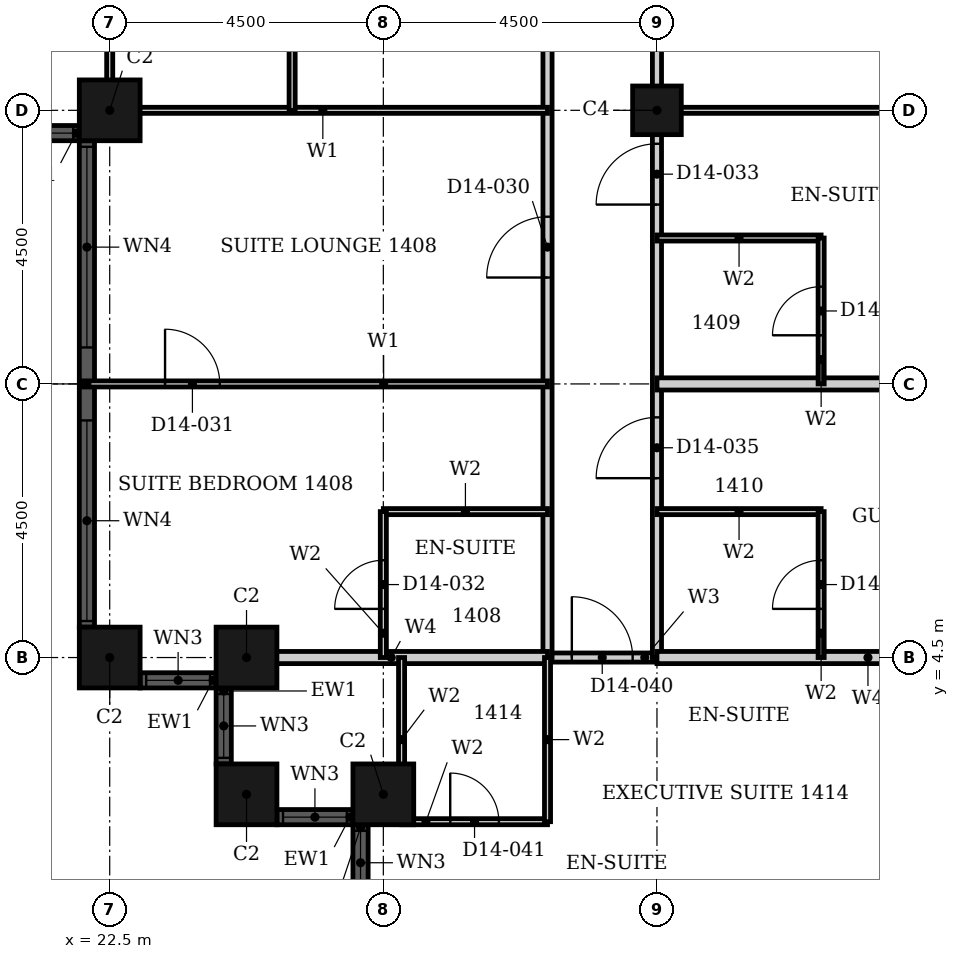
"""IFC4 building model, lengths in metres.
Left out: names, types, materials, properties, quantities, classifications, styles, units other than length and angle.
Written with IfcOpenShell. Run it as: python <this file> out.ifc"""

import sys

from ifc_helpers import new_model, si_unit, direction, frame, frame_2d, origin, origin_2d, place, context, subcontext, project, spatial, rectangle, hollow_rectangle, extrude, element, fill, save


model = new_model("IFC4")
c1 = context("Model", 3, precision=1e-05, world=origin(), true_north=direction((0.0, 1.0)))
c2 = subcontext(c1, "Body", "Model", "MODEL_VIEW")
j1 = project(units=[si_unit("LENGTHUNIT", "METRE"), si_unit("PLANEANGLEUNIT", "RADIAN")], contexts=[c1])
p1 = place(None, origin())
s1 = spatial("IfcSite", under=j1, at=p1, CompositionType="ELEMENT")
p2 = place(p1, origin())
s2 = spatial("IfcBuilding", under=s1, at=p2, CompositionType="ELEMENT")
p3 = place(p2, frame((0.0, 0.0, 63.6)))
s3 = spatial("IfcBuildingStorey", under=s2, at=p3, CompositionType="ELEMENT", Elevation=63.6)
for number, where, z_axis, x_axis in (
    (1, (22.5, 4.5, 0.0), (0.0, 0.0, 1.0), (1.0, 0.0, 0.0)),
    (2, (24.75, 4.5, 0.0), (0.0, 0.0, 1.0), (1.0, 0.0, 0.0)),
    (3, (24.75, 2.25, 0.0), (0.0, 0.0, 1.0), (1.0, 0.0, 0.0)),
    (4, (27.0, 2.25, 0.0), (0.0, 0.0, 1.0), (1.0, 0.0, 0.0)),
    (5, (22.5, 13.5, 0.0), (0.0, 0.0, 1.0), (1.0, 0.0, 0.0)),
):
    element("IfcColumn", number, at=place(p3, frame(where, z_axis=z_axis, x_axis=x_axis)), inside=s3, PredefinedType="COLUMN", context=c2, shape_type="SweptSolid", body=[
        extrude(hollow_rectangle(XDim=1.0, YDim=1.0, WallThickness=0.032, at=origin_2d()), origin(), (0.0, 0.0, 1.0), 3.6),
    ])
p4 = place(p3, frame((31.5, 13.5, 0.0), z_axis=(0.0, 0.0, 1.0), x_axis=(1.0, 0.0, 0.0)))
e6 = element("IfcColumn", 6, at=p4, inside=s3, PredefinedType="COLUMN", context=c2, shape_type="SweptSolid", body=[
    extrude(hollow_rectangle(XDim=0.8, YDim=0.8, WallThickness=0.025, at=origin_2d()), origin(), (0.0, 0.0, 1.0), 3.6),
])
p5 = place(p3, frame((23.0, 4.125, 0.0), z_axis=(0.0, 0.0, 1.0), x_axis=(1.0, 0.0, 0.0)))
e7 = element("IfcWall", 7, at=p5, inside=s3, PredefinedType="SOLIDWALL", context=c2, shape_type="SweptSolid", body=[
    extrude(rectangle(XDim=1.25, YDim=0.25, at=frame_2d((0.625, 0.0))), origin(), (0.0, 0.0, 1.0), 3.6),
])
p6 = place(p5, frame((0.1, 0.0, 0.9)))
e8 = element("IfcOpeningElement", 8, at=p6, cuts=e7, PredefinedType="OPENING", context=c2, shape_type="SweptSolid", body=[
    extrude(rectangle(XDim=1.05, YDim=2.08, at=frame_2d((0.525, 1.04))), frame((0.0, 0.135, 0.0), z_axis=(0.0, -1.0, 0.0), x_axis=(1.0, 0.0, 0.0)), (0.0, 0.0, 1.0), 0.27),
])
p7 = place(p3, frame((24.375, 4.0, 0.0), z_axis=(0.0, 0.0, 1.0), x_axis=(0.0, -1.0, 0.0)))
e9 = element("IfcWall", 9, at=p7, inside=s3, PredefinedType="SOLIDWALL", context=c2, shape_type="SweptSolid", body=[
    extrude(rectangle(XDim=1.25, YDim=0.25, at=frame_2d((0.625, 0.0))), origin(), (0.0, 0.0, 1.0), 3.6),
])
p8 = place(p7, frame((0.1, 0.0, 0.9)))
e10 = element("IfcOpeningElement", 10, at=p8, cuts=e9, PredefinedType="OPENING", context=c2, shape_type="SweptSolid", body=[
    extrude(rectangle(XDim=1.05, YDim=2.08, at=frame_2d((0.525, 1.04))), frame((0.0, 0.135, 0.0), z_axis=(0.0, -1.0, 0.0), x_axis=(1.0, 0.0, 0.0)), (0.0, 0.0, 1.0), 0.27),
])
p9 = place(p3, frame((25.25, 1.875, 0.0), z_axis=(0.0, 0.0, 1.0), x_axis=(1.0, 0.0, 0.0)))
e11 = element("IfcWall", 11, at=p9, inside=s3, PredefinedType="SOLIDWALL", context=c2, shape_type="SweptSolid", body=[
    extrude(rectangle(XDim=1.25, YDim=0.25, at=frame_2d((0.625, 0.0))), origin(), (0.0, 0.0, 1.0), 3.6),
])
p10 = place(p9, frame((0.1, 0.0, 0.9)))
e12 = element("IfcOpeningElement", 12, at=p10, cuts=e11, PredefinedType="OPENING", context=c2, shape_type="SweptSolid", body=[
    extrude(rectangle(XDim=1.05, YDim=2.08, at=frame_2d((0.525, 1.04))), frame((0.0, 0.135, 0.0), z_axis=(0.0, -1.0, 0.0), x_axis=(1.0, 0.0, 0.0)), (0.0, 0.0, 1.0), 0.27),
])
p11 = place(p3, frame((26.625, 1.75, 0.0), z_axis=(0.0, 0.0, 1.0), x_axis=(0.0, -1.0, 0.0)))
e13 = element("IfcWall", 13, at=p11, inside=s3, PredefinedType="SOLIDWALL", context=c2, shape_type="SweptSolid", body=[
    extrude(rectangle(XDim=1.25, YDim=0.25, at=frame_2d((0.625, 0.0))), origin(), (0.0, 0.0, 1.0), 3.6),
])
p12 = place(p11, frame((0.1, 0.0, 0.9)))
e14 = element("IfcOpeningElement", 14, at=p12, cuts=e13, PredefinedType="OPENING", context=c2, shape_type="SweptSolid", body=[
    extrude(rectangle(XDim=1.05, YDim=2.08, at=frame_2d((0.525, 1.04))), frame((0.0, 0.135, 0.0), z_axis=(0.0, -1.0, 0.0), x_axis=(1.0, 0.0, 0.0)), (0.0, 0.0, 1.0), 0.27),
])
p13 = place(p3, frame((18.5, 13.125, 0.0), z_axis=(0.0, 0.0, 1.0), x_axis=(1.0, 0.0, 0.0)))
e15 = element("IfcWall", 15, at=p13, inside=s3, PredefinedType="SOLIDWALL", context=c2, shape_type="SweptSolid", body=[
    extrude(rectangle(XDim=3.5, YDim=0.25, at=frame_2d((1.75, 0.0))), origin(), (0.0, 0.0, 1.0), 3.6),
])
p14 = place(p13, frame((0.1, 0.0, 0.9)))
e16 = element("IfcOpeningElement", 16, at=p14, cuts=e15, PredefinedType="OPENING", context=c2, shape_type="SweptSolid", body=[
    extrude(rectangle(XDim=3.3, YDim=2.08, at=frame_2d((1.65, 1.04))), frame((0.0, 0.135, 0.0), z_axis=(0.0, -1.0, 0.0), x_axis=(1.0, 0.0, 0.0)), (0.0, 0.0, 1.0), 0.27),
])
p15 = place(p3, frame((22.125, 13.0, 0.0), z_axis=(0.0, 0.0, 1.0), x_axis=(0.0, -1.0, 0.0)))
e17 = element("IfcWall", 17, at=p15, inside=s3, PredefinedType="SOLIDWALL", context=c2, shape_type="SweptSolid", body=[
    extrude(rectangle(XDim=8.0, YDim=0.25, at=frame_2d((4.0, 0.0))), origin(), (0.0, 0.0, 1.0), 3.6),
])
p16 = place(p15, frame((0.1, 0.0, 0.9)))
e18 = element("IfcOpeningElement", 18, at=p16, cuts=e17, PredefinedType="OPENING", context=c2, shape_type="SweptSolid", body=[
    extrude(rectangle(XDim=3.3, YDim=2.08, at=frame_2d((1.65, 1.04))), frame((0.0, 0.135, 0.0), z_axis=(0.0, -1.0, 0.0), x_axis=(1.0, 0.0, 0.0)), (0.0, 0.0, 1.0), 0.27),
])
p17 = place(p15, frame((4.6, 0.0, 0.9)))
e19 = element("IfcOpeningElement", 19, at=p17, cuts=e17, PredefinedType="OPENING", context=c2, shape_type="SweptSolid", body=[
    extrude(rectangle(XDim=3.3, YDim=2.08, at=frame_2d((1.65, 1.04))), frame((0.0, 0.135, 0.0), z_axis=(0.0, -1.0, 0.0), x_axis=(1.0, 0.0, 0.0)), (0.0, 0.0, 1.0), 0.27),
])
p18 = place(p3, frame((29.7, 4.5, 0.0), z_axis=(0.0, 0.0, 1.0), x_axis=(1.0, 0.0, 0.0)))
e20 = element("IfcWall", 20, at=p18, inside=s3, PredefinedType="PARTITIONING", context=c2, shape_type="SweptSolid", body=[
    extrude(rectangle(XDim=1.8, YDim=0.15, at=frame_2d((0.9, 0.0))), origin(), (0.0, 0.0, 1.0), 3.3),
])
p19 = place(p18, frame((0.4, 0.0, 0.0)))
e21 = element("IfcOpeningElement", 21, at=p19, cuts=e20, PredefinedType="OPENING", context=c2, shape_type="SweptSolid", body=[
    extrude(rectangle(XDim=1.0, YDim=2.1, at=frame_2d((0.5, 1.05))), frame((0.0, 0.085, 0.0), z_axis=(0.0, -1.0, 0.0), x_axis=(1.0, 0.0, 0.0)), (0.0, 0.0, 1.0), 0.17),
])
p20 = place(p3, frame((29.7, 4.5, 0.0), z_axis=(0.0, 0.0, 1.0), x_axis=(0.0, 1.0, 0.0)))
e22 = element("IfcWall", 22, at=p20, inside=s3, PredefinedType="PARTITIONING", context=c2, shape_type="SweptSolid", body=[
    extrude(rectangle(XDim=16.2, YDim=0.15, at=frame_2d((8.1, 0.0))), origin(), (0.0, 0.0, 1.0), 3.3),
])
p21 = place(p20, frame((6.25, 0.0, 0.0)))
e23 = element("IfcOpeningElement", 23, at=p21, cuts=e22, PredefinedType="OPENING", context=c2, shape_type="SweptSolid", body=[
    extrude(rectangle(XDim=1.0, YDim=2.1, at=frame_2d((0.5, 1.05))), frame((0.0, 0.085, 0.0), z_axis=(0.0, -1.0, 0.0), x_axis=(1.0, 0.0, 0.0)), (0.0, 0.0, 1.0), 0.17),
])
p22 = place(p3, frame((31.5, 4.5, 0.0), z_axis=(0.0, 0.0, 1.0), x_axis=(0.0, 1.0, 0.0)))
e24 = element("IfcWall", 24, at=p22, inside=s3, PredefinedType="PARTITIONING", context=c2, shape_type="SweptSolid", body=[
    extrude(rectangle(XDim=16.2, YDim=0.15, at=frame_2d((8.1, 0.0))), origin(), (0.0, 0.0, 1.0), 2.58),
])
p23 = place(p22, frame((7.45, 0.0, 0.0)))
e25 = element("IfcOpeningElement", 25, at=p23, cuts=e24, PredefinedType="OPENING", context=c2, shape_type="SweptSolid", body=[
    extrude(rectangle(XDim=1.0, YDim=2.1, at=frame_2d((0.5, 1.05))), frame((0.0, 0.085, 0.0), z_axis=(0.0, -1.0, 0.0), x_axis=(1.0, 0.0, 0.0)), (0.0, 0.0, 1.0), 0.17),
])
p24 = place(p22, frame((2.95, 0.0, 0.0)))
e26 = element("IfcOpeningElement", 26, at=p24, cuts=e24, PredefinedType="OPENING", context=c2, shape_type="SweptSolid", body=[
    extrude(rectangle(XDim=1.0, YDim=2.1, at=frame_2d((0.5, 1.05))), frame((0.0, 0.085, 0.0), z_axis=(0.0, -1.0, 0.0), x_axis=(1.0, 0.0, 0.0)), (0.0, 0.0, 1.0), 0.17),
])
p25 = place(p3, frame((31.5, 13.5, 0.0), z_axis=(0.0, 0.0, 1.0), x_axis=(1.0, 0.0, 0.0)))
e27 = element("IfcWall", 27, at=p25, inside=s3, PredefinedType="PARTITIONING", context=c2, shape_type="SweptSolid", body=[
    extrude(rectangle(XDim=9.19, YDim=0.1, at=frame_2d((4.595, 0.0))), origin(), (0.0, 0.0, 1.0), 2.38),
])
p26 = place(p3, frame((22.31, 13.5, 0.0), z_axis=(0.0, 0.0, 1.0), x_axis=(1.0, 0.0, 0.0)))
e28 = element("IfcWall", 28, at=p26, inside=s3, PredefinedType="PARTITIONING", context=c2, shape_type="SweptSolid", body=[
    extrude(rectangle(XDim=7.39, YDim=0.1, at=frame_2d((3.695, 0.0))), origin(), (0.0, 0.0, 1.0), 2.38),
])
p27 = place(p3, frame((22.06, 9.0, 0.0), z_axis=(0.0, 0.0, 1.0), x_axis=(1.0, 0.0, 0.0)))
e29 = element("IfcWall", 29, at=p27, inside=s3, PredefinedType="PARTITIONING", context=c2, shape_type="SweptSolid", body=[
    extrude(rectangle(XDim=7.64, YDim=0.1, at=frame_2d((3.82, 0.0))), origin(), (0.0, 0.0, 1.0), 3.3),
])
p28 = place(p27, frame((1.35, 0.0, 0.0)))
e30 = element("IfcOpeningElement", 30, at=p28, cuts=e29, PredefinedType="OPENING", context=c2, shape_type="SweptSolid", body=[
    extrude(rectangle(XDim=0.9, YDim=2.1, at=frame_2d((0.45, 1.05))), frame((0.0, 0.06, 0.0), z_axis=(0.0, -1.0, 0.0), x_axis=(1.0, 0.0, 0.0)), (0.0, 0.0, 1.0), 0.12),
])
p29 = place(p3, frame((22.5, 13.31, 0.0), z_axis=(0.0, 0.0, 1.0), x_axis=(0.0, 1.0, 0.0)))
e31 = element("IfcWall", 31, at=p29, inside=s3, PredefinedType="PARTITIONING", context=c2, shape_type="SweptSolid", body=[
    extrude(rectangle(XDim=7.39, YDim=0.1, at=frame_2d((3.695, 0.0))), origin(), (0.0, 0.0, 1.0), 3.3),
])
p30 = place(p3, frame((25.5, 13.5, 0.0), z_axis=(0.0, 0.0, 1.0), x_axis=(0.0, 1.0, 0.0)))
e32 = element("IfcWall", 32, at=p30, inside=s3, PredefinedType="PARTITIONING", context=c2, shape_type="SweptSolid", body=[
    extrude(rectangle(XDim=7.2, YDim=0.1, at=frame_2d((3.6, 0.0))), origin(), (0.0, 0.0, 1.0), 3.3),
])
p31 = place(p3, frame((31.5, 4.5, 0.0), z_axis=(0.0, 0.0, 1.0), x_axis=(1.0, 0.0, 0.0)))
e33 = element("IfcWall", 33, at=p31, inside=s3, PredefinedType="PARTITIONING", context=c2, shape_type="SweptSolid", body=[
    extrude(rectangle(XDim=6.94, YDim=0.2, at=frame_2d((3.47, 0.0))), origin(), (0.0, 0.0, 1.0), 3.3),
])
p32 = place(p3, frame((24.56, 4.5, 0.0), z_axis=(0.0, 0.0, 1.0), x_axis=(1.0, 0.0, 0.0)))
e34 = element("IfcWall", 34, at=p32, inside=s3, PredefinedType="PARTITIONING", context=c2, shape_type="SweptSolid", body=[
    extrude(rectangle(XDim=5.14, YDim=0.2, at=frame_2d((2.57, 0.0))), origin(), (0.0, 0.0, 1.0), 3.3),
])
p33 = place(p3, frame((31.5, 9.0, 0.0), z_axis=(0.0, 0.0, 1.0), x_axis=(1.0, 0.0, 0.0)))
e35 = element("IfcWall", 35, at=p33, inside=s3, PredefinedType="PARTITIONING", context=c2, shape_type="SweptSolid", body=[
    extrude(rectangle(XDim=9.44, YDim=0.2, at=frame_2d((4.72, 0.0))), origin(), (0.0, 0.0, 1.0), 3.3),
])
p34 = place(p3, frame((27.3, 1.8, 0.0), z_axis=(0.0, 0.0, 1.0), x_axis=(1.0, 0.0, 0.0)))
e36 = element("IfcWall", 36, at=p34, inside=s3, PredefinedType="PARTITIONING", context=c2, shape_type="SweptSolid", body=[
    extrude(rectangle(XDim=2.4, YDim=0.1, at=frame_2d((1.2, 0.0))), origin(), (0.0, 0.0, 1.0), 3.3),
])
p35 = place(p34, frame((0.8, 0.0, 0.0)))
e37 = element("IfcOpeningElement", 37, at=p35, cuts=e36, PredefinedType="OPENING", context=c2, shape_type="SweptSolid", body=[
    extrude(rectangle(XDim=0.8, YDim=2.1, at=frame_2d((0.4, 1.05))), frame((0.0, 0.06, 0.0), z_axis=(0.0, -1.0, 0.0), x_axis=(1.0, 0.0, 0.0)), (0.0, 0.0, 1.0), 0.12),
])
for number, where, z_axis, x_axis in (
    (38, (31.5, 11.4, 0.0), (0.0, 0.0, 1.0), (1.0, 0.0, 0.0)),
    (39, (31.5, 6.9, 0.0), (0.0, 0.0, 1.0), (1.0, 0.0, 0.0)),
    (40, (27.0, 6.9, 0.0), (0.0, 0.0, 1.0), (1.0, 0.0, 0.0)),
):
    element("IfcWall", number, at=place(p3, frame(where, z_axis=z_axis, x_axis=x_axis)), inside=s3, PredefinedType="PARTITIONING", context=c2, shape_type="SweptSolid", body=[
        extrude(rectangle(XDim=2.7, YDim=0.1, at=frame_2d((1.35, 0.0))), origin(), (0.0, 0.0, 1.0), 3.3),
    ])
p36 = place(p3, frame((27.0, 4.5, 0.0), z_axis=(0.0, 0.0, 1.0), x_axis=(0.0, 1.0, 0.0)))
e41 = element("IfcWall", 41, at=p36, inside=s3, PredefinedType="PARTITIONING", context=c2, shape_type="SweptSolid", body=[
    extrude(rectangle(XDim=2.4, YDim=0.1, at=frame_2d((1.2, 0.0))), origin(), (0.0, 0.0, 1.0), 2.58),
])
p37 = place(p36, frame((0.8, 0.0, 0.0)))
e42 = element("IfcOpeningElement", 42, at=p37, cuts=e41, PredefinedType="OPENING", context=c2, shape_type="SweptSolid", body=[
    extrude(rectangle(XDim=0.8, YDim=2.1, at=frame_2d((0.4, 1.05))), frame((0.0, 0.06, 0.0), z_axis=(0.0, -1.0, 0.0), x_axis=(1.0, 0.0, 0.0)), (0.0, 0.0, 1.0), 0.12),
])
for number, where, z_axis, x_axis in (
    (43, (27.3, 1.8, 0.0), (0.0, 0.0, 1.0), (0.0, 1.0, 0.0)),
    (44, (29.7, 1.8, 0.0), (0.0, 0.0, 1.0), (0.0, 1.0, 0.0)),
):
    element("IfcWall", number, at=place(p3, frame(where, z_axis=z_axis, x_axis=x_axis)), inside=s3, PredefinedType="PARTITIONING", context=c2, shape_type="SweptSolid", body=[
        extrude(rectangle(XDim=2.7, YDim=0.1, at=frame_2d((1.35, 0.0))), origin(), (0.0, 0.0, 1.0), 3.3),
    ])
p38 = place(p3, frame((34.2, 9.0, 0.0), z_axis=(0.0, 0.0, 1.0), x_axis=(0.0, 1.0, 0.0)))
e45 = element("IfcWall", 45, at=p38, inside=s3, PredefinedType="PARTITIONING", context=c2, shape_type="SweptSolid", body=[
    extrude(rectangle(XDim=2.4, YDim=0.1, at=frame_2d((1.2, 0.0))), origin(), (0.0, 0.0, 1.0), 3.3),
])
p39 = place(p38, frame((0.8, 0.0, 0.0)))
e46 = element("IfcOpeningElement", 46, at=p39, cuts=e45, PredefinedType="OPENING", context=c2, shape_type="SweptSolid", body=[
    extrude(rectangle(XDim=0.8, YDim=2.1, at=frame_2d((0.4, 1.05))), frame((0.0, 0.06, 0.0), z_axis=(0.0, -1.0, 0.0), x_axis=(1.0, 0.0, 0.0)), (0.0, 0.0, 1.0), 0.12),
])
p40 = place(p3, frame((34.2, 4.5, 0.0), z_axis=(0.0, 0.0, 1.0), x_axis=(0.0, 1.0, 0.0)))
e47 = element("IfcWall", 47, at=p40, inside=s3, PredefinedType="PARTITIONING", context=c2, shape_type="SweptSolid", body=[
    extrude(rectangle(XDim=2.4, YDim=0.1, at=frame_2d((1.2, 0.0))), origin(), (0.0, 0.0, 1.0), 3.3),
])
p41 = place(p40, frame((0.8, 0.0, 0.0)))
e48 = element("IfcOpeningElement", 48, at=p41, cuts=e47, PredefinedType="OPENING", context=c2, shape_type="SweptSolid", body=[
    extrude(rectangle(XDim=0.8, YDim=2.1, at=frame_2d((0.4, 1.05))), frame((0.0, 0.06, 0.0), z_axis=(0.0, -1.0, 0.0), x_axis=(1.0, 0.0, 0.0)), (0.0, 0.0, 1.0), 0.12),
])
p42 = place(p6, origin())
e49 = element("IfcWindow", 49, at=p42, inside=s3, PartitioningType="SINGLE_PANEL", PredefinedType="WINDOW", context=c2, shape_type="SweptSolid", body=[
    extrude(rectangle(XDim=1.05, YDim=2.08, at=frame_2d((0.525, 1.04))), frame((0.0, 0.03, 0.0), z_axis=(0.0, -1.0, 0.0), x_axis=(1.0, 0.0, 0.0)), (0.0, 0.0, 1.0), 0.06),
])
fill(e8, e49)
p43 = place(p8, origin())
e50 = element("IfcWindow", 50, at=p43, inside=s3, PartitioningType="SINGLE_PANEL", PredefinedType="WINDOW", context=c2, shape_type="SweptSolid", body=[
    extrude(rectangle(XDim=1.05, YDim=2.08, at=frame_2d((0.525, 1.04))), frame((0.0, 0.03, 0.0), z_axis=(0.0, -1.0, 0.0), x_axis=(1.0, 0.0, 0.0)), (0.0, 0.0, 1.0), 0.06),
])
fill(e10, e50)
p44 = place(p10, origin())
e51 = element("IfcWindow", 51, at=p44, inside=s3, PartitioningType="SINGLE_PANEL", PredefinedType="WINDOW", context=c2, shape_type="SweptSolid", body=[
    extrude(rectangle(XDim=1.05, YDim=2.08, at=frame_2d((0.525, 1.04))), frame((0.0, 0.03, 0.0), z_axis=(0.0, -1.0, 0.0), x_axis=(1.0, 0.0, 0.0)), (0.0, 0.0, 1.0), 0.06),
])
fill(e12, e51)
p45 = place(p12, origin())
e52 = element("IfcWindow", 52, at=p45, inside=s3, PartitioningType="SINGLE_PANEL", PredefinedType="WINDOW", context=c2, shape_type="SweptSolid", body=[
    extrude(rectangle(XDim=1.05, YDim=2.08, at=frame_2d((0.525, 1.04))), frame((0.0, 0.03, 0.0), z_axis=(0.0, -1.0, 0.0), x_axis=(1.0, 0.0, 0.0)), (0.0, 0.0, 1.0), 0.06),
])
fill(e14, e52)
p46 = place(p14, origin())
e53 = element("IfcWindow", 53, at=p46, inside=s3, PartitioningType="SINGLE_PANEL", PredefinedType="WINDOW", context=c2, shape_type="SweptSolid", body=[
    extrude(rectangle(XDim=3.3, YDim=2.08, at=frame_2d((1.65, 1.04))), frame((0.0, 0.03, 0.0), z_axis=(0.0, -1.0, 0.0), x_axis=(1.0, 0.0, 0.0)), (0.0, 0.0, 1.0), 0.06),
])
fill(e16, e53)
p47 = place(p16, origin())
e54 = element("IfcWindow", 54, at=p47, inside=s3, PartitioningType="SINGLE_PANEL", PredefinedType="WINDOW", context=c2, shape_type="SweptSolid", body=[
    extrude(rectangle(XDim=3.3, YDim=2.08, at=frame_2d((1.65, 1.04))), frame((0.0, 0.03, 0.0), z_axis=(0.0, -1.0, 0.0), x_axis=(1.0, 0.0, 0.0)), (0.0, 0.0, 1.0), 0.06),
])
fill(e18, e54)
p48 = place(p17, origin())
e55 = element("IfcWindow", 55, at=p48, inside=s3, PartitioningType="SINGLE_PANEL", PredefinedType="WINDOW", context=c2, shape_type="SweptSolid", body=[
    extrude(rectangle(XDim=3.3, YDim=2.08, at=frame_2d((1.65, 1.04))), frame((0.0, 0.03, 0.0), z_axis=(0.0, -1.0, 0.0), x_axis=(1.0, 0.0, 0.0)), (0.0, 0.0, 1.0), 0.06),
])
fill(e19, e55)
p49 = place(p21, origin())
e56 = element("IfcDoor", 56, at=p49, inside=s3, OperationType="SINGLE_SWING_RIGHT", PredefinedType="DOOR", context=c2, shape_type="SweptSolid", body=[
    extrude(rectangle(XDim=1.0, YDim=2.1, at=frame_2d((0.5, 1.05))), frame((0.0, 0.025, 0.0), z_axis=(0.0, -1.0, 0.0), x_axis=(1.0, 0.0, 0.0)), (0.0, 0.0, 1.0), 0.05),
])
fill(e23, e56)
p50 = place(p28, origin())
e57 = element("IfcDoor", 57, at=p50, inside=s3, OperationType="SINGLE_SWING_LEFT", PredefinedType="DOOR", context=c2, shape_type="SweptSolid", body=[
    extrude(rectangle(XDim=0.9, YDim=2.1, at=frame_2d((0.45, 1.05))), frame((0.0, 0.025, 0.0), z_axis=(0.0, -1.0, 0.0), x_axis=(1.0, 0.0, 0.0)), (0.0, 0.0, 1.0), 0.05),
])
fill(e30, e57)
p51 = place(p37, origin())
e58 = element("IfcDoor", 58, at=p51, inside=s3, OperationType="SINGLE_SWING_LEFT", PredefinedType="DOOR", context=c2, shape_type="SweptSolid", body=[
    extrude(rectangle(XDim=0.8, YDim=2.1, at=frame_2d((0.4, 1.05))), frame((0.0, 0.025, 0.0), z_axis=(0.0, -1.0, 0.0), x_axis=(1.0, 0.0, 0.0)), (0.0, 0.0, 1.0), 0.05),
])
fill(e42, e58)
p52 = place(p23, origin())
e59 = element("IfcDoor", 59, at=p52, inside=s3, OperationType="SINGLE_SWING_RIGHT", PredefinedType="DOOR", context=c2, shape_type="SweptSolid", body=[
    extrude(rectangle(XDim=1.0, YDim=2.1, at=frame_2d((0.5, 1.05))), frame((0.0, 0.025, 0.0), z_axis=(0.0, -1.0, 0.0), x_axis=(1.0, 0.0, 0.0)), (0.0, 0.0, 1.0), 0.05),
])
fill(e25, e59)
p53 = place(p39, origin())
e60 = element("IfcDoor", 60, at=p53, inside=s3, OperationType="SINGLE_SWING_LEFT", PredefinedType="DOOR", context=c2, shape_type="SweptSolid", body=[
    extrude(rectangle(XDim=0.8, YDim=2.1, at=frame_2d((0.4, 1.05))), frame((0.0, 0.025, 0.0), z_axis=(0.0, -1.0, 0.0), x_axis=(1.0, 0.0, 0.0)), (0.0, 0.0, 1.0), 0.05),
])
fill(e46, e60)
p54 = place(p24, origin())
e61 = element("IfcDoor", 61, at=p54, inside=s3, OperationType="SINGLE_SWING_RIGHT", PredefinedType="DOOR", context=c2, shape_type="SweptSolid", body=[
    extrude(rectangle(XDim=1.0, YDim=2.1, at=frame_2d((0.5, 1.05))), frame((0.0, 0.025, 0.0), z_axis=(0.0, -1.0, 0.0), x_axis=(1.0, 0.0, 0.0)), (0.0, 0.0, 1.0), 0.05),
])
fill(e26, e61)
p55 = place(p41, origin())
e62 = element("IfcDoor", 62, at=p55, inside=s3, OperationType="SINGLE_SWING_LEFT", PredefinedType="DOOR", context=c2, shape_type="SweptSolid", body=[
    extrude(rectangle(XDim=0.8, YDim=2.1, at=frame_2d((0.4, 1.05))), frame((0.0, 0.025, 0.0), z_axis=(0.0, -1.0, 0.0), x_axis=(1.0, 0.0, 0.0)), (0.0, 0.0, 1.0), 0.05),
])
fill(e48, e62)
p56 = place(p19, origin())
e63 = element("IfcDoor", 63, at=p56, inside=s3, OperationType="SINGLE_SWING_LEFT", PredefinedType="DOOR", context=c2, shape_type="SweptSolid", body=[
    extrude(rectangle(XDim=1.0, YDim=2.1, at=frame_2d((0.5, 1.05))), frame((0.0, 0.025, 0.0), z_axis=(0.0, -1.0, 0.0), x_axis=(1.0, 0.0, 0.0)), (0.0, 0.0, 1.0), 0.05),
])
fill(e21, e63)
p57 = place(p35, origin())
e64 = element("IfcDoor", 64, at=p57, inside=s3, OperationType="SINGLE_SWING_LEFT", PredefinedType="DOOR", context=c2, shape_type="SweptSolid", body=[
    extrude(rectangle(XDim=0.8, YDim=2.1, at=frame_2d((0.4, 1.05))), frame((0.0, 0.025, 0.0), z_axis=(0.0, -1.0, 0.0), x_axis=(1.0, 0.0, 0.0)), (0.0, 0.0, 1.0), 0.05),
])
fill(e37, e64)
save(model, sys.argv[1])
